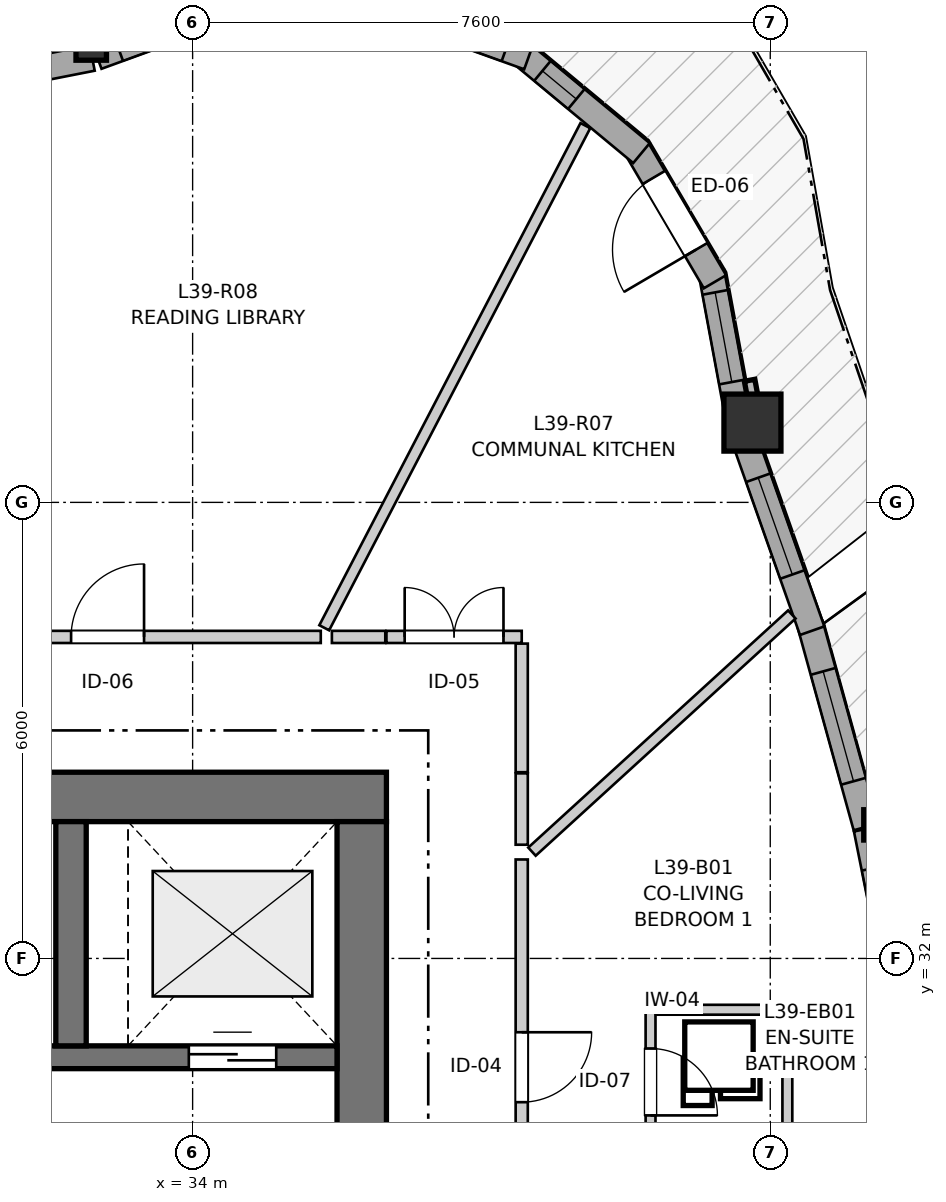
"""IFC4 building model, lengths in metres.
Left out: names, types, materials, properties, quantities, classifications, styles, units other than length and angle.
Written with IfcOpenShell. Run it as: python <this file> out.ifc"""

import sys

from ifc_helpers import new_model, si_unit, direction, frame, frame_2d, origin, origin_2d, place, context, subcontext, project, spatial, rectangle, i_section, extrude, source, transform, mapped, element, fill, save


model = new_model("IFC4")
c1 = context("Model", 3, precision=1e-05, world=origin(), true_north=direction((0.0, 1.0)))
c2 = subcontext(c1, "Body", "Model", "MODEL_VIEW")
j1 = project(units=[si_unit("LENGTHUNIT", "METRE"), si_unit("PLANEANGLEUNIT", "RADIAN")], contexts=[c1])
p1 = place(None, origin())
s1 = spatial("IfcSite", under=j1, at=p1, CompositionType="ELEMENT")
p2 = place(p1, origin())
s2 = spatial("IfcBuilding", under=s1, at=p2, CompositionType="ELEMENT")
p3 = place(p2, frame((0.0, 0.0, 133.0)))
s3 = spatial("IfcBuildingStorey", under=s2, at=p3, CompositionType="ELEMENT", Elevation=133.0)
p4 = place(p3, frame((36.55, 34.125, 0.0), z_axis=(0.0, 0.0, 1.0), x_axis=(-1.0, 0.0, 0.0)))
e1 = element("IfcWall", 1, at=p4, inside=s3, PredefinedType="SHEAR", context=c2, shape_type="SweptSolid", body=[
    extrude(rectangle(XDim=12.4, YDim=0.65, at=frame_2d((6.2, 0.0))), origin(), (0.0, 0.0, 1.0), 2.95),
])
p5 = place(p3, frame((36.225, 18.2, 0.0), z_axis=(0.0, 0.0, 1.0), x_axis=(0.0, 1.0, 0.0)))
e2 = element("IfcWall", 2, at=p5, inside=s3, PredefinedType="SHEAR", context=c2, shape_type="SweptSolid", body=[
    extrude(rectangle(XDim=15.6, YDim=0.65, at=frame_2d((7.8, 0.0))), origin(), (0.0, 0.0, 1.0), 2.95),
])
p6 = place(p5, frame((4.25, 0.0, 0.0)))
e3 = element("IfcOpeningElement", 3, at=p6, cuts=e2, PredefinedType="OPENING", context=c2, shape_type="SweptSolid", body=[
    extrude(rectangle(XDim=1.1, YDim=2.15, at=frame_2d((0.55, 1.075))), frame((0.0, 0.335, 0.0), z_axis=(0.0, -1.0, 0.0), x_axis=(1.0, 0.0, 0.0)), (0.0, 0.0, 1.0), 0.67),
])
p7 = place(p5, frame((10.25, 0.0, 0.0)))
e4 = element("IfcOpeningElement", 4, at=p7, cuts=e2, PredefinedType="OPENING", context=c2, shape_type="SweptSolid", body=[
    extrude(rectangle(XDim=1.1, YDim=2.15, at=frame_2d((0.55, 1.075))), frame((0.0, 0.335, 0.0), z_axis=(0.0, -1.0, 0.0), x_axis=(1.0, 0.0, 0.0)), (0.0, 0.0, 1.0), 0.67),
])
p8 = place(p3, frame((24.8, 30.7, 0.0), z_axis=(0.0, 0.0, 1.0), x_axis=(1.0, 0.0, 0.0)))
e5 = element("IfcWall", 5, at=p8, inside=s3, PredefinedType="SHEAR", context=c2, shape_type="SweptSolid", body=[
    extrude(rectangle(XDim=11.1, YDim=0.3, at=frame_2d((5.55, 0.0))), origin(), (0.0, 0.0, 1.0), 2.95),
])
p9 = place(p8, frame((6.22, 0.0, 0.0)))
e6 = element("IfcOpeningElement", 6, at=p9, cuts=e5, PredefinedType="OPENING", context=c2, shape_type="SweptSolid", body=[
    extrude(rectangle(XDim=0.98, YDim=2.15, at=frame_2d((0.49, 1.075))), frame((0.0, 0.16, 0.0), z_axis=(0.0, -1.0, 0.0), x_axis=(1.0, 0.0, 0.0)), (0.0, 0.0, 1.0), 0.32),
])
p10 = place(p8, frame((9.15, 0.0, 0.0)))
e7 = element("IfcOpeningElement", 7, at=p10, cuts=e5, PredefinedType="OPENING", context=c2, shape_type="SweptSolid", body=[
    extrude(rectangle(XDim=1.15, YDim=2.15, at=frame_2d((0.575, 1.075))), frame((0.0, 0.16, 0.0), z_axis=(0.0, -1.0, 0.0), x_axis=(1.0, 0.0, 0.0)), (0.0, 0.0, 1.0), 0.32),
])
p11 = place(p3, frame((32.4, 30.85, 0.0), z_axis=(0.0, 0.0, 1.0), x_axis=(0.0, 1.0, 0.0)))
e8 = element("IfcWall", 8, at=p11, inside=s3, PredefinedType="SHEAR", context=c2, shape_type="SweptSolid", body=[
    extrude(rectangle(XDim=2.95, YDim=0.4, at=frame_2d((1.475, 0.0))), origin(), (0.0, 0.0, 1.0), 2.95),
])
m1 = source(origin(), c2, "Body", "SweptSolid", [
    extrude(i_section(OverallWidth=0.401, OverallDepth=0.399, WebThickness=0.023, FlangeThickness=0.036, FilletRadius=0.015, at=origin_2d()), origin(), (0.0, 0.0, 1.0), 2.95),
])
p12 = place(p3, frame((43.031, 33.757, 0.0), z_axis=(0.0, 0.0, 1.0), x_axis=(1.0, 0.0, 0.0)))
e9 = element("IfcColumn", 9, at=p12, inside=s3, PredefinedType="PILASTER", context=c2, shape_type="MappedRepresentation", body=[
    mapped(m1, transform((0.0, 0.0, 0.0), x_axis=(1.0, 0.0, 0.0), y_axis=(0.0, 1.0, 0.0), z_axis=(0.0, 0.0, 1.0), scale=1.0)),
])
m2 = source(origin(), c2, "Body", "SweptSolid", [
    extrude(rectangle(XDim=0.75, YDim=0.75, at=origin_2d()), origin(), (0.0, 0.0, 1.0), 2.95),
])
p13 = place(p3, frame((41.365, 39.05, 0.0), z_axis=(0.0, 0.0, 1.0), x_axis=(1.0, 0.0, 0.0)))
e10 = element("IfcColumn", 10, at=p13, inside=s3, PredefinedType="COLUMN", context=c2, shape_type="MappedRepresentation", body=[
    mapped(m2, transform((0.0, 0.0, 0.0), x_axis=(1.0, 0.0, 0.0), y_axis=(0.0, 1.0, 0.0), z_axis=(0.0, 0.0, 1.0), scale=1.0)),
])
p14 = place(p3, frame((32.666, 44.017, 0.0), z_axis=(0.0, 0.0, 1.0), x_axis=(1.0, 0.0, 0.0)))
e11 = element("IfcColumn", 11, at=p14, inside=s3, PredefinedType="PILASTER", context=c2, shape_type="MappedRepresentation", body=[
    mapped(m1, transform((0.0, 0.0, 0.0), x_axis=(1.0, 0.0, 0.0), y_axis=(0.0, 1.0, 0.0), z_axis=(0.0, 0.0, 1.0), scale=1.0)),
])
p15 = place(p3, frame((43.401, 31.037, 0.0), z_axis=(0.0, 0.0, 1.0), x_axis=(-0.196047084538, 0.980594483283, 0.0)))
e12 = element("IfcWall", 12, at=p15, inside=s3, PredefinedType="SOLIDWALL", context=c2, shape_type="SweptSolid", body=[
    extrude(rectangle(XDim=2.72, YDim=0.34, at=frame_2d((1.36, 0.0))), origin(), (0.0, 0.0, 1.0), 2.53),
])
p16 = place(p15, frame((0.545, 0.0, 0.82)))
e13 = element("IfcOpeningElement", 13, at=p16, cuts=e12, PredefinedType="OPENING", context=c2, shape_type="SweptSolid", body=[
    extrude(rectangle(XDim=1.65, YDim=1.45, at=frame_2d((0.825, 0.725))), frame((0.0, 0.18, 0.0), z_axis=(0.0, -1.0, 0.0), x_axis=(1.0, 0.0, 0.0)), (0.0, 0.0, 1.0), 0.36),
])
p17 = place(p3, frame((42.861, 33.731, 0.0), z_axis=(0.0, 0.0, 1.0), x_axis=(-0.266277078362, 0.96389652844, 0.0)))
e14 = element("IfcWall", 14, at=p17, inside=s3, PredefinedType="SOLIDWALL", context=c2, shape_type="SweptSolid", body=[
    extrude(rectangle(XDim=2.764, YDim=0.34, at=frame_2d((1.382, 0.0))), origin(), (0.0, 0.0, 1.0), 2.53),
])
p18 = place(p17, frame((0.622, 0.0, 0.82)))
e15 = element("IfcOpeningElement", 15, at=p18, cuts=e14, PredefinedType="OPENING", context=c2, shape_type="SweptSolid", body=[
    extrude(rectangle(XDim=1.5, YDim=1.45, at=frame_2d((0.75, 0.725))), frame((0.0, 0.18, 0.0), z_axis=(0.0, -1.0, 0.0), x_axis=(1.0, 0.0, 0.0)), (0.0, 0.0, 1.0), 0.36),
])
p19 = place(p3, frame((42.151, 36.312, 0.0), z_axis=(0.0, 0.0, 1.0), x_axis=(-0.332691841861, 0.94303559761, 0.0)))
e16 = element("IfcWall", 16, at=p19, inside=s3, PredefinedType="SOLIDWALL", context=c2, shape_type="SweptSolid", body=[
    extrude(rectangle(XDim=2.688, YDim=0.34, at=frame_2d((1.344, 0.0))), origin(), (0.0, 0.0, 1.0), 2.53),
])
p20 = place(p19, frame((0.784, 0.0, 0.82)))
e17 = element("IfcOpeningElement", 17, at=p20, cuts=e16, PredefinedType="OPENING", context=c2, shape_type="SweptSolid", body=[
    extrude(rectangle(XDim=1.35, YDim=1.45, at=frame_2d((0.675, 0.725))), frame((0.0, 0.18, 0.0), z_axis=(0.0, -1.0, 0.0), x_axis=(1.0, 0.0, 0.0)), (0.0, 0.0, 1.0), 0.36),
])
p21 = place(p3, frame((41.17, 39.171, 0.0), z_axis=(0.0, 0.0, 1.0), x_axis=(-0.182297593262, 0.983243401956, 0.0)))
e18 = element("IfcWall", 18, at=p21, inside=s3, PredefinedType="SOLIDWALL", context=c2, shape_type="SweptSolid", body=[
    extrude(rectangle(XDim=1.888, YDim=0.34, at=frame_2d((0.944, 0.0))), origin(), (0.0, 0.0, 1.0), 2.53),
])
p22 = place(p21, frame((0.419, 0.0, 0.82)))
e19 = element("IfcOpeningElement", 19, at=p22, cuts=e18, PredefinedType="OPENING", context=c2, shape_type="SweptSolid", body=[
    extrude(rectangle(XDim=1.2, YDim=1.45, at=frame_2d((0.6, 0.725))), frame((0.0, 0.18, 0.0), z_axis=(0.0, -1.0, 0.0), x_axis=(1.0, 0.0, 0.0)), (0.0, 0.0, 1.0), 0.36),
])
p23 = place(p3, frame((40.873, 40.902, 0.0), z_axis=(0.0, 0.0, 1.0), x_axis=(-0.506225227923, 0.862401309493, 0.0)))
e20 = element("IfcWall", 20, at=p23, inside=s3, PredefinedType="SOLIDWALL", context=c2, shape_type="SweptSolid", body=[
    extrude(rectangle(XDim=2.081, YDim=0.34, at=frame_2d((1.041, 0.0))), origin(), (0.0, 0.0, 1.0), 2.53),
])
p24 = place(p23, frame((0.49, 0.0, 0.0)))
e21 = element("IfcOpeningElement", 21, at=p24, cuts=e20, PredefinedType="OPENING", context=c2, shape_type="SweptSolid", body=[
    extrude(rectangle(XDim=1.1, YDim=2.1, at=frame_2d((0.55, 1.05))), frame((0.0, 0.18, 0.0), z_axis=(0.0, -1.0, 0.0), x_axis=(1.0, 0.0, 0.0)), (0.0, 0.0, 1.0), 0.36),
])
p25 = place(p3, frame((39.906, 42.595, 0.0), z_axis=(0.0, 0.0, 1.0), x_axis=(-0.769584999316, 0.638544382817, 0.0)))
e22 = element("IfcWall", 22, at=p25, inside=s3, PredefinedType="SOLIDWALL", context=c2, shape_type="SweptSolid", body=[
    extrude(rectangle(XDim=2.081, YDim=0.34, at=frame_2d((1.041, 0.0))), origin(), (0.0, 0.0, 1.0), 2.53),
])
p26 = place(p25, frame((1.114, 0.0, 0.82)))
e23 = element("IfcOpeningElement", 23, at=p26, cuts=e22, PredefinedType="OPENING", context=c2, shape_type="SweptSolid", body=[
    extrude(rectangle(XDim=0.58, YDim=1.35, at=frame_2d((0.29, 0.675))), frame((0.0, 0.18, 0.0), z_axis=(0.0, -1.0, 0.0), x_axis=(1.0, 0.0, 0.0)), (0.0, 0.0, 1.0), 0.36),
])
p27 = place(p3, frame((38.42, 43.858, 0.0), z_axis=(0.0, 0.0, 1.0), x_axis=(-0.941071215914, 0.338208466153, 0.0)))
e24 = element("IfcWall", 24, at=p27, inside=s3, PredefinedType="SOLIDWALL", context=c2, shape_type="SweptSolid", body=[
    extrude(rectangle(XDim=2.081, YDim=0.34, at=frame_2d((1.041, 0.0))), origin(), (0.0, 0.0, 1.0), 2.53),
])
p28 = place(p27, frame((0.316, 0.0, 0.82)))
e25 = element("IfcOpeningElement", 25, at=p28, cuts=e24, PredefinedType="OPENING", context=c2, shape_type="SweptSolid", body=[
    extrude(rectangle(XDim=1.45, YDim=1.25, at=frame_2d((0.725, 0.625))), frame((0.0, 0.18, 0.0), z_axis=(0.0, -1.0, 0.0), x_axis=(1.0, 0.0, 0.0)), (0.0, 0.0, 1.0), 0.36),
])
p29 = place(p3, frame((34.644, 44.557, 0.0), z_axis=(0.0, 0.0, 1.0), x_axis=(-0.939440593615, -0.342711790092, 0.0)))
e26 = element("IfcWall", 26, at=p29, inside=s3, PredefinedType="SOLIDWALL", context=c2, shape_type="SweptSolid", body=[
    extrude(rectangle(XDim=2.023, YDim=0.34, at=frame_2d((1.012, 0.0))), origin(), (0.0, 0.0, 1.0), 2.53),
])
p30 = place(p29, frame((0.322, 0.0, 0.82)))
e27 = element("IfcOpeningElement", 27, at=p30, cuts=e26, PredefinedType="OPENING", context=c2, shape_type="SweptSolid", body=[
    extrude(rectangle(XDim=1.4, YDim=1.35, at=frame_2d((0.7, 0.675))), frame((0.0, 0.18, 0.0), z_axis=(0.0, -1.0, 0.0), x_axis=(1.0, 0.0, 0.0)), (0.0, 0.0, 1.0), 0.36),
])
p31 = place(p3, frame((32.679, 43.846, 0.0), z_axis=(0.0, 0.0, 1.0), x_axis=(-0.981247929568, -0.192749839736, 0.0)))
e28 = element("IfcWall", 28, at=p31, inside=s3, PredefinedType="SOLIDWALL", context=c2, shape_type="SweptSolid", body=[
    extrude(rectangle(XDim=2.776, YDim=0.34, at=frame_2d((1.388, 0.0))), origin(), (0.0, 0.0, 1.0), 2.53),
])
p32 = place(p31, frame((0.753, 0.0, 0.82)))
e29 = element("IfcOpeningElement", 29, at=p32, cuts=e28, PredefinedType="OPENING", context=c2, shape_type="SweptSolid", body=[
    extrude(rectangle(XDim=1.25, YDim=1.35, at=frame_2d((0.625, 0.675))), frame((0.0, 0.18, 0.0), z_axis=(0.0, -1.0, 0.0), x_axis=(1.0, 0.0, 0.0)), (0.0, 0.0, 1.0), 0.36),
])
p33 = place(p3, frame((30.078, 36.23, 0.0), z_axis=(0.0, 0.0, 1.0), x_axis=(1.0, 0.0, 0.0)))
e30 = element("IfcWall", 30, at=p33, inside=s3, PredefinedType="PARTITIONING", context=c2, shape_type="SweptSolid", body=[
    extrude(rectangle(XDim=5.608, YDim=0.16, at=frame_2d((2.804, 0.0))), origin(), (0.0, 0.0, 1.0), 2.588),
])
p34 = place(p33, frame((2.323, 0.0, 0.0)))
e31 = element("IfcOpeningElement", 31, at=p34, cuts=e30, PredefinedType="OPENING", context=c2, shape_type="SweptSolid", body=[
    extrude(rectangle(XDim=0.96, YDim=2.1, at=frame_2d((0.48, 1.05))), frame((0.0, 0.09, 0.0), z_axis=(0.0, -1.0, 0.0), x_axis=(1.0, 0.0, 0.0)), (0.0, 0.0, 1.0), 0.18),
])
p35 = place(p3, frame((38.33, 33.302, 0.0), z_axis=(0.0, 0.0, 1.0), x_axis=(0.0, -1.0, 0.0)))
e32 = element("IfcWall", 32, at=p35, inside=s3, PredefinedType="PARTITIONING", context=c2, shape_type="SweptSolid", body=[
    extrude(rectangle(XDim=5.462, YDim=0.16, at=frame_2d((2.731, 0.0))), origin(), (0.0, 0.0, 1.0), 2.588),
])
p36 = place(p35, frame((2.273, 0.0, 0.0)))
e33 = element("IfcOpeningElement", 33, at=p36, cuts=e32, PredefinedType="OPENING", context=c2, shape_type="SweptSolid", body=[
    extrude(rectangle(XDim=0.92, YDim=2.1, at=frame_2d((0.46, 1.05))), frame((0.0, 0.09, 0.0), z_axis=(0.0, -1.0, 0.0), x_axis=(1.0, 0.0, 0.0)), (0.0, 0.0, 1.0), 0.18),
])
p37 = place(p3, frame((40.025, 31.325, 0.0), z_axis=(0.0, 0.0, 1.0), x_axis=(0.0, -1.0, 0.0)))
e34 = element("IfcWall", 34, at=p37, inside=s3, PredefinedType="PARTITIONING", context=c2, shape_type="SweptSolid", body=[
    extrude(rectangle(XDim=1.9, YDim=0.13, at=frame_2d((0.95, 0.0))), origin(), (0.0, 0.0, 1.0), 2.95),
])
p38 = place(p37, frame((0.51, 0.0, 0.0)))
e35 = element("IfcOpeningElement", 35, at=p38, cuts=e34, PredefinedType="OPENING", context=c2, shape_type="SweptSolid", body=[
    extrude(rectangle(XDim=0.88, YDim=2.05, at=frame_2d((0.44, 1.025))), frame((0.0, 0.075, 0.0), z_axis=(0.0, -1.0, 0.0), x_axis=(1.0, 0.0, 0.0)), (0.0, 0.0, 1.0), 0.15),
])
p39 = place(p3, frame((36.55, 36.23, 0.0), z_axis=(0.0, 0.0, 1.0), x_axis=(1.0, 0.0, 0.0)))
e36 = element("IfcWall", 36, at=p39, inside=s3, PredefinedType="PARTITIONING", context=c2, shape_type="SweptSolid", body=[
    extrude(rectangle(XDim=1.78, YDim=0.16, at=frame_2d((0.89, 0.0))), origin(), (0.0, 0.0, 1.0), 2.95),
])
p40 = place(p39, frame((0.24, 0.0, 0.0)))
e37 = element("IfcOpeningElement", 37, at=p40, cuts=e36, PredefinedType="OPENING", context=c2, shape_type="SweptSolid", body=[
    extrude(rectangle(XDim=1.3, YDim=2.1, at=frame_2d((0.65, 1.05))), frame((0.0, 0.09, 0.0), z_axis=(0.0, -1.0, 0.0), x_axis=(1.0, 0.0, 0.0)), (0.0, 0.0, 1.0), 0.18),
])
p41 = place(p3, frame((35.732, 36.351, 0.0), z_axis=(0.0, 0.0, 1.0), x_axis=(0.461386804, 0.887199085378, 0.0)))
e38 = element("IfcWall", 38, at=p41, inside=s3, PredefinedType="PARTITIONING", context=c2, shape_type="SweptSolid", body=[
    extrude(rectangle(XDim=7.446, YDim=0.145, at=frame_2d((3.723, 0.0))), origin(), (0.0, 0.0, 1.0), 2.95),
])
p42 = place(p3, frame((38.465, 33.405, 0.0), z_axis=(0.0, 0.0, 1.0), x_axis=(0.738623645331, 0.674118024205, 0.0)))
e39 = element("IfcWall", 39, at=p42, inside=s3, PredefinedType="PARTITIONING", context=c2, shape_type="SweptSolid", body=[
    extrude(rectangle(XDim=4.629, YDim=0.145, at=frame_2d((2.314, 0.0))), origin(), (0.0, 0.0, 1.0), 2.95),
])
p43 = place(p3, frame((41.825, 29.425, 0.0), z_axis=(0.0, 0.0, 1.0), x_axis=(0.0, 1.0, 0.0)))
e40 = element("IfcWall", 40, at=p43, inside=s3, PredefinedType="PARTITIONING", context=c2, shape_type="SweptSolid", body=[
    extrude(rectangle(XDim=1.9, YDim=0.13, at=frame_2d((0.95, 0.0))), origin(), (0.0, 0.0, 1.0), 2.95),
])
p44 = place(p3, frame((40.098, 31.325, 0.0), z_axis=(0.0, 0.0, 1.0), x_axis=(1.0, 0.0, 0.0)))
e41 = element("IfcWall", 41, at=p44, inside=s3, PredefinedType="PARTITIONING", context=c2, shape_type="SweptSolid", body=[
    extrude(rectangle(XDim=1.654, YDim=0.13, at=frame_2d((0.827, 0.0))), origin(), (0.0, 0.0, 1.0), 2.95),
])
p45 = place(p3, frame((38.33, 34.45, 0.0), z_axis=(0.0, 0.0, 1.0), x_axis=(0.0, 1.0, 0.0)))
e42 = element("IfcWall", 42, at=p45, inside=s3, PredefinedType="PARTITIONING", context=c2, shape_type="SweptSolid", body=[
    extrude(rectangle(XDim=1.692, YDim=0.16, at=frame_2d((0.846, 0.0))), origin(), (0.0, 0.0, 1.0), 2.588),
])
p46 = place(p3, frame((38.33, 33.496, 0.0), z_axis=(0.0, 0.0, 1.0), x_axis=(0.0, 1.0, 0.0)))
e43 = element("IfcWall", 43, at=p46, inside=s3, PredefinedType="PARTITIONING", context=c2, shape_type="SweptSolid", body=[
    extrude(rectangle(XDim=0.939, YDim=0.16, at=frame_2d((0.469, 0.0))), origin(), (0.0, 0.0, 1.0), 2.588),
])
p47 = place(p3, frame((35.832, 36.23, 0.0), z_axis=(0.0, 0.0, 1.0), x_axis=(1.0, 0.0, 0.0)))
e44 = element("IfcWall", 44, at=p47, inside=s3, PredefinedType="PARTITIONING", context=c2, shape_type="SweptSolid", body=[
    extrude(rectangle(XDim=0.703, YDim=0.16, at=frame_2d((0.351, 0.0))), origin(), (0.0, 0.0, 1.0), 2.95),
])
m3 = source(origin(), c2, "Body", "SweptSolid", [
    extrude(rectangle(XDim=1.5, YDim=1.45, at=frame_2d((0.75, 0.725))), frame((0.0, 0.03, 0.0), z_axis=(0.0, -1.0, 0.0), x_axis=(1.0, 0.0, 0.0)), (0.0, 0.0, 1.0), 0.06),
])
p48 = place(p18, origin())
e45 = element("IfcWindow", 45, at=p48, inside=s3, PartitioningType="SINGLE_PANEL", PredefinedType="WINDOW", context=c2, shape_type="MappedRepresentation", body=[
    mapped(m3, transform((0.0, 0.0, 0.0), x_axis=(1.0, 0.0, 0.0), y_axis=(0.0, 1.0, 0.0), z_axis=(0.0, 0.0, 1.0), scale=1.0)),
])
fill(e15, e45)
m4 = source(origin(), c2, "Body", "SweptSolid", [
    extrude(rectangle(XDim=1.35, YDim=1.45, at=frame_2d((0.675, 0.725))), frame((0.0, 0.03, 0.0), z_axis=(0.0, -1.0, 0.0), x_axis=(1.0, 0.0, 0.0)), (0.0, 0.0, 1.0), 0.06),
])
p49 = place(p20, origin())
e46 = element("IfcWindow", 46, at=p49, inside=s3, PartitioningType="SINGLE_PANEL", PredefinedType="WINDOW", context=c2, shape_type="MappedRepresentation", body=[
    mapped(m4, transform((0.0, 0.0, 0.0), x_axis=(1.0, 0.0, 0.0), y_axis=(0.0, 1.0, 0.0), z_axis=(0.0, 0.0, 1.0), scale=1.0)),
])
fill(e17, e46)
m5 = source(origin(), c2, "Body", "SweptSolid", [
    extrude(rectangle(XDim=1.2, YDim=1.45, at=frame_2d((0.6, 0.725))), frame((0.0, 0.03, 0.0), z_axis=(0.0, -1.0, 0.0), x_axis=(1.0, 0.0, 0.0)), (0.0, 0.0, 1.0), 0.06),
])
p50 = place(p22, origin())
e47 = element("IfcWindow", 47, at=p50, inside=s3, PartitioningType="SINGLE_PANEL", PredefinedType="WINDOW", context=c2, shape_type="MappedRepresentation", body=[
    mapped(m5, transform((0.0, 0.0, 0.0), x_axis=(1.0, 0.0, 0.0), y_axis=(0.0, 1.0, 0.0), z_axis=(0.0, 0.0, 1.0), scale=1.0)),
])
fill(e19, e47)
m6 = source(origin(), c2, "Body", "SweptSolid", [
    extrude(rectangle(XDim=1.1, YDim=2.1, at=frame_2d((0.55, 1.05))), frame((0.0, 0.025, 0.0), z_axis=(0.0, -1.0, 0.0), x_axis=(1.0, 0.0, 0.0)), (0.0, 0.0, 1.0), 0.05),
])
p51 = place(p24, origin())
e48 = element("IfcDoor", 48, at=p51, inside=s3, OperationType="SINGLE_SWING_LEFT", PredefinedType="DOOR", context=c2, shape_type="MappedRepresentation", body=[
    mapped(m6, transform((0.0, 0.0, 0.0), x_axis=(1.0, 0.0, 0.0), y_axis=(0.0, 1.0, 0.0), z_axis=(0.0, 0.0, 1.0), scale=1.0)),
])
fill(e21, e48)
m7 = source(origin(), c2, "Body", "SweptSolid", [
    extrude(rectangle(XDim=0.58, YDim=1.35, at=frame_2d((0.29, 0.675))), frame((0.0, 0.03, 0.0), z_axis=(0.0, -1.0, 0.0), x_axis=(1.0, 0.0, 0.0)), (0.0, 0.0, 1.0), 0.06),
])
p52 = place(p26, origin())
e49 = element("IfcWindow", 49, at=p52, inside=s3, PartitioningType="SINGLE_PANEL", PredefinedType="WINDOW", context=c2, shape_type="MappedRepresentation", body=[
    mapped(m7, transform((0.0, 0.0, 0.0), x_axis=(1.0, 0.0, 0.0), y_axis=(0.0, 1.0, 0.0), z_axis=(0.0, 0.0, 1.0), scale=1.0)),
])
fill(e23, e49)
m8 = source(origin(), c2, "Body", "SweptSolid", [
    extrude(rectangle(XDim=1.15, YDim=2.15, at=frame_2d((0.575, 1.075))), frame((0.0, 0.025, 0.0), z_axis=(0.0, -1.0, 0.0), x_axis=(1.0, 0.0, 0.0)), (0.0, 0.0, 1.0), 0.05),
])
p53 = place(p10, origin())
e50 = element("IfcDoor", 50, at=p53, inside=s3, OperationType="DOUBLE_DOOR_SLIDING", PredefinedType="DOOR", context=c2, shape_type="MappedRepresentation", body=[
    mapped(m8, transform((0.0, 0.0, 0.0), x_axis=(1.0, 0.0, 0.0), y_axis=(0.0, 1.0, 0.0), z_axis=(0.0, 0.0, 1.0), scale=1.0)),
])
fill(e7, e50)
m9 = source(origin(), c2, "Body", "SweptSolid", [
    extrude(rectangle(XDim=0.96, YDim=2.1, at=frame_2d((0.48, 1.05))), frame((0.0, 0.025, 0.0), z_axis=(0.0, -1.0, 0.0), x_axis=(1.0, 0.0, 0.0)), (0.0, 0.0, 1.0), 0.05),
])
p54 = place(p34, origin())
e51 = element("IfcDoor", 51, at=p54, inside=s3, OperationType="SINGLE_SWING_RIGHT", PredefinedType="DOOR", context=c2, shape_type="MappedRepresentation", body=[
    mapped(m9, transform((0.0, 0.0, 0.0), x_axis=(1.0, 0.0, 0.0), y_axis=(0.0, 1.0, 0.0), z_axis=(0.0, 0.0, 1.0), scale=1.0)),
])
fill(e31, e51)
m10 = source(origin(), c2, "Body", "SweptSolid", [
    extrude(rectangle(XDim=0.92, YDim=2.1, at=frame_2d((0.46, 1.05))), frame((0.0, 0.025, 0.0), z_axis=(0.0, -1.0, 0.0), x_axis=(1.0, 0.0, 0.0)), (0.0, 0.0, 1.0), 0.05),
])
p55 = place(p36, origin())
e52 = element("IfcDoor", 52, at=p55, inside=s3, OperationType="SINGLE_SWING_LEFT", PredefinedType="DOOR", context=c2, shape_type="MappedRepresentation", body=[
    mapped(m10, transform((0.0, 0.0, 0.0), x_axis=(1.0, 0.0, 0.0), y_axis=(0.0, 1.0, 0.0), z_axis=(0.0, 0.0, 1.0), scale=1.0)),
])
fill(e33, e52)
m11 = source(origin(), c2, "Body", "SweptSolid", [
    extrude(rectangle(XDim=0.88, YDim=2.05, at=frame_2d((0.44, 1.025))), frame((0.0, 0.025, 0.0), z_axis=(0.0, -1.0, 0.0), x_axis=(1.0, 0.0, 0.0)), (0.0, 0.0, 1.0), 0.05),
])
p56 = place(p38, origin())
e53 = element("IfcDoor", 53, at=p56, inside=s3, OperationType="SINGLE_SWING_RIGHT", PredefinedType="DOOR", context=c2, shape_type="MappedRepresentation", body=[
    mapped(m11, transform((0.0, 0.0, 0.0), x_axis=(1.0, 0.0, 0.0), y_axis=(0.0, 1.0, 0.0), z_axis=(0.0, 0.0, 1.0), scale=1.0)),
])
fill(e35, e53)
m12 = source(origin(), c2, "Body", "SweptSolid", [
    extrude(rectangle(XDim=1.3, YDim=2.1, at=frame_2d((0.65, 1.05))), frame((0.0, 0.025, 0.0), z_axis=(0.0, -1.0, 0.0), x_axis=(1.0, 0.0, 0.0)), (0.0, 0.0, 1.0), 0.05),
])
p57 = place(p40, origin())
e54 = element("IfcDoor", 54, at=p57, inside=s3, OperationType="DOUBLE_DOOR_SINGLE_SWING", PredefinedType="DOOR", context=c2, shape_type="MappedRepresentation", body=[
    mapped(m12, transform((0.0, 0.0, 0.0), x_axis=(1.0, 0.0, 0.0), y_axis=(0.0, 1.0, 0.0), z_axis=(0.0, 0.0, 1.0), scale=1.0)),
])
fill(e37, e54)
save(model, sys.argv[1])
